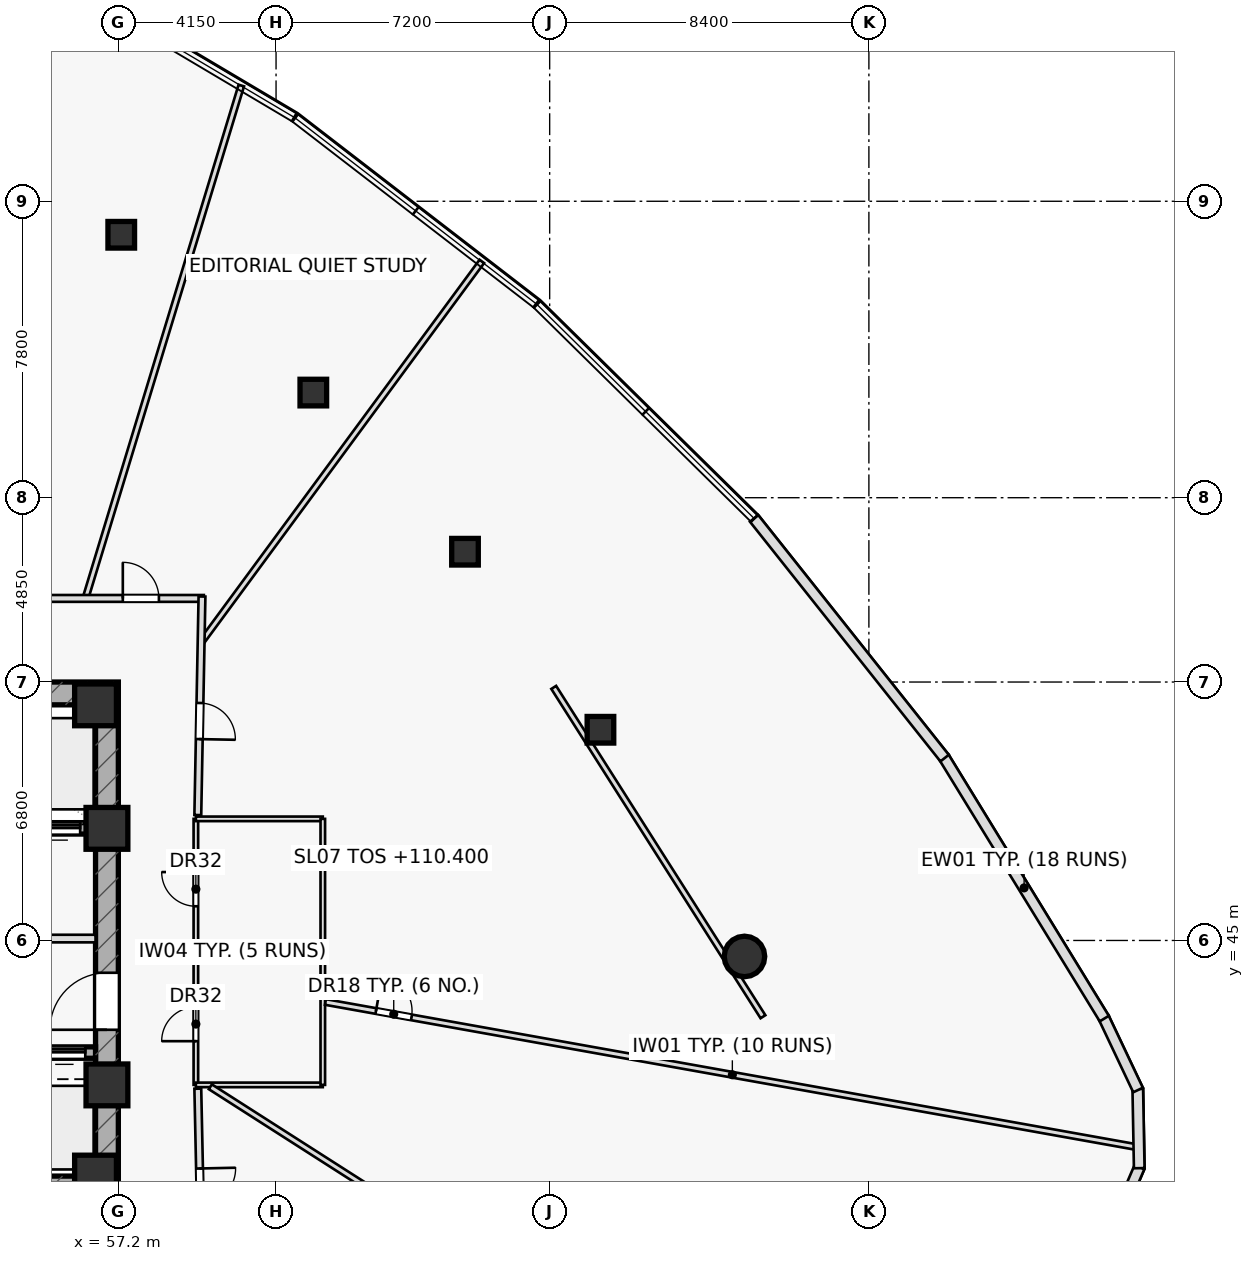
"""IFC4 building model, lengths in metres.
Left out: names, types, materials, properties, quantities, classifications, styles, units other than length and angle.
Written with IfcOpenShell. Run it as: python <this file> out.ifc"""

import sys

from ifc_helpers import new_model, si_unit, direction, frame, frame_2d, origin, origin_2d, place, context, subcontext, project, spatial, rectangle, hollow_rectangle, hollow_circle, extrude, element, fill, save


model = new_model("IFC4")
c1 = context("Model", 3, precision=1e-05, world=origin(), true_north=direction((0.0, 1.0)))
c2 = subcontext(c1, "Body", "Model", "MODEL_VIEW")
j1 = project(units=[si_unit("LENGTHUNIT", "METRE"), si_unit("PLANEANGLEUNIT", "RADIAN")], contexts=[c1])
p1 = place(None, origin())
s1 = spatial("IfcSite", under=j1, at=p1, CompositionType="ELEMENT")
p2 = place(p1, origin())
s2 = spatial("IfcBuilding", under=s1, at=p2, CompositionType="ELEMENT")
p3 = place(p2, frame((0.0, 0.0, 110.4)))
s3 = spatial("IfcBuildingStorey", under=s2, at=p3, CompositionType="ELEMENT", Elevation=110.4)
p4 = place(p3, frame((42.8, 51.5, 0.0), z_axis=(0.0, 0.0, 1.0), x_axis=(1.0, 0.0, 0.0)))
e1 = element("IfcWall", 1, at=p4, inside=s3, PredefinedType="SHEAR", context=c2, shape_type="SweptSolid", body=[
    extrude(rectangle(XDim=14.4, YDim=0.6, at=frame_2d((7.2, 0.0))), origin(), (0.0, 0.0, 1.0), 4.9),
])
p5 = place(p4, frame((0.88, 0.0, 0.0)))
e2 = element("IfcOpeningElement", 2, at=p5, cuts=e1, PredefinedType="OPENING", context=c2, shape_type="SweptSolid", body=[
    extrude(rectangle(XDim=1.05, YDim=2.2, at=frame_2d((0.525, 1.1))), frame((0.0, 0.31, 0.0), z_axis=(0.0, -1.0, 0.0), x_axis=(1.0, 0.0, 0.0)), (0.0, 0.0, 1.0), 0.62),
])
p6 = place(p3, frame((42.8, 38.5, 0.0), z_axis=(0.0, 0.0, 1.0), x_axis=(1.0, 0.0, 0.0)))
e3 = element("IfcWall", 3, at=p6, inside=s3, PredefinedType="SHEAR", context=c2, shape_type="SweptSolid", body=[
    extrude(rectangle(XDim=14.4, YDim=0.6, at=frame_2d((7.2, 0.0))), origin(), (0.0, 0.0, 1.0), 4.9),
])
p7 = place(p6, frame((0.88, 0.0, 0.0)))
e4 = element("IfcOpeningElement", 4, at=p7, cuts=e3, PredefinedType="OPENING", context=c2, shape_type="SweptSolid", body=[
    extrude(rectangle(XDim=1.05, YDim=2.2, at=frame_2d((0.525, 1.1))), frame((0.0, 0.31, 0.0), z_axis=(0.0, -1.0, 0.0), x_axis=(1.0, 0.0, 0.0)), (0.0, 0.0, 1.0), 0.62),
])
p8 = place(p3, frame((56.9, 38.8, 0.0), z_axis=(0.0, 0.0, 1.0), x_axis=(0.0, 1.0, 0.0)))
e5 = element("IfcWall", 5, at=p8, inside=s3, PredefinedType="SHEAR", context=c2, shape_type="SweptSolid", body=[
    extrude(rectangle(XDim=12.4, YDim=0.6, at=frame_2d((6.2, 0.0))), origin(), (0.0, 0.0, 1.0), 4.9),
])
p9 = place(p8, frame((3.85, 0.0, 0.0)))
e6 = element("IfcOpeningElement", 6, at=p9, cuts=e5, PredefinedType="OPENING", context=c2, shape_type="SweptSolid", body=[
    extrude(rectangle(XDim=1.5, YDim=2.2, at=frame_2d((0.75, 1.1))), frame((0.0, 0.31, 0.0), z_axis=(0.0, -1.0, 0.0), x_axis=(1.0, 0.0, 0.0)), (0.0, 0.0, 1.0), 0.62),
])
p10 = place(p3, frame((43.4, 47.95, 0.0), z_axis=(0.0, 0.0, 1.0), x_axis=(1.0, 0.0, 0.0)))
e7 = element("IfcWall", 7, at=p10, inside=s3, PredefinedType="SHEAR", context=c2, shape_type="SweptSolid", body=[
    extrude(rectangle(XDim=13.2, YDim=0.3, at=frame_2d((6.6, 0.0))), origin(), (0.0, 0.0, 1.0), 4.9),
])
p11 = place(p10, frame((8.345, 0.0, 0.0)))
e8 = element("IfcOpeningElement", 8, at=p11, cuts=e7, PredefinedType="OPENING", context=c2, shape_type="SweptSolid", body=[
    extrude(rectangle(XDim=1.15, YDim=2.2, at=frame_2d((0.575, 1.1))), frame((0.0, 0.16, 0.0), z_axis=(0.0, -1.0, 0.0), x_axis=(1.0, 0.0, 0.0)), (0.0, 0.0, 1.0), 0.32),
])
p12 = place(p10, frame((10.065, 0.0, 0.0)))
e9 = element("IfcOpeningElement", 9, at=p12, cuts=e7, PredefinedType="OPENING", context=c2, shape_type="SweptSolid", body=[
    extrude(rectangle(XDim=1.15, YDim=2.2, at=frame_2d((0.575, 1.1))), frame((0.0, 0.16, 0.0), z_axis=(0.0, -1.0, 0.0), x_axis=(1.0, 0.0, 0.0)), (0.0, 0.0, 1.0), 0.32),
])
p13 = place(p10, frame((11.645, 0.0, 0.0)))
e10 = element("IfcOpeningElement", 10, at=p13, cuts=e7, PredefinedType="OPENING", context=c2, shape_type="SweptSolid", body=[
    extrude(rectangle(XDim=1.15, YDim=2.2, at=frame_2d((0.575, 1.1))), frame((0.0, 0.16, 0.0), z_axis=(0.0, -1.0, 0.0), x_axis=(1.0, 0.0, 0.0)), (0.0, 0.0, 1.0), 0.32),
])
p14 = place(p3, frame((43.4, 42.05, 0.0), z_axis=(0.0, 0.0, 1.0), x_axis=(1.0, 0.0, 0.0)))
e11 = element("IfcWall", 11, at=p14, inside=s3, PredefinedType="SHEAR", context=c2, shape_type="SweptSolid", body=[
    extrude(rectangle(XDim=13.2, YDim=0.3, at=frame_2d((6.6, 0.0))), origin(), (0.0, 0.0, 1.0), 4.9),
])
p15 = place(p14, frame((8.37, 0.0, 0.0)))
e12 = element("IfcOpeningElement", 12, at=p15, cuts=e11, PredefinedType="OPENING", context=c2, shape_type="SweptSolid", body=[
    extrude(rectangle(XDim=1.1, YDim=2.15, at=frame_2d((0.55, 1.075))), frame((0.0, 0.16, 0.0), z_axis=(0.0, -1.0, 0.0), x_axis=(1.0, 0.0, 0.0)), (0.0, 0.0, 1.0), 0.32),
])
p16 = place(p14, frame((10.09, 0.0, 0.0)))
e13 = element("IfcOpeningElement", 13, at=p16, cuts=e11, PredefinedType="OPENING", context=c2, shape_type="SweptSolid", body=[
    extrude(rectangle(XDim=1.1, YDim=2.15, at=frame_2d((0.55, 1.075))), frame((0.0, 0.16, 0.0), z_axis=(0.0, -1.0, 0.0), x_axis=(1.0, 0.0, 0.0)), (0.0, 0.0, 1.0), 0.32),
])
p17 = place(p14, frame((11.83, 0.0, 0.0)))
e14 = element("IfcOpeningElement", 14, at=p17, cuts=e11, PredefinedType="OPENING", context=c2, shape_type="SweptSolid", body=[
    extrude(rectangle(XDim=1.1, YDim=2.15, at=frame_2d((0.55, 1.075))), frame((0.0, 0.16, 0.0), z_axis=(0.0, -1.0, 0.0), x_axis=(1.0, 0.0, 0.0)), (0.0, 0.0, 1.0), 0.32),
])
for number, where, z_axis, x_axis in (
    (15, (56.9, 47.95, 0.0), (0.0, 0.0, 1.0), (1.0, 0.0, 0.0)),
    (16, (56.6, 51.2, 0.0), (0.0, 0.0, 1.0), (1.0, 0.0, 0.0)),
    (17, (56.9, 41.2, 0.0), (0.0, 0.0, 1.0), (1.0, 0.0, 0.0)),
    (18, (56.6, 38.8, 0.0), (0.0, 0.0, 1.0), (1.0, 0.0, 0.0)),
):
    element("IfcColumn", number, at=place(p3, frame(where, z_axis=z_axis, x_axis=x_axis)), inside=s3, PredefinedType="COLUMN", context=c2, shape_type="SweptSolid", body=[
        extrude(rectangle(XDim=1.1, YDim=1.1, at=origin_2d()), origin(), (0.0, 0.0, 1.0), 4.9),
    ])
p18 = place(p3, frame((73.676, 44.58, 0.0), z_axis=(0.0, 0.0, 1.0), x_axis=(1.0, 0.0, 0.0)))
e19 = element("IfcColumn", 19, at=p18, inside=s3, PredefinedType="COLUMN", context=c2, shape_type="SweptSolid", body=[
    extrude(hollow_circle(Radius=0.533, WallThickness=0.045, at=origin_2d()), origin(), (0.0, 0.0, 1.0), 4.9),
])
for number, where, z_axis, x_axis in (
    (20, (69.886, 50.544, 0.0), (0.0, 0.0, 1.0), (1.0, 0.0, 0.0)),
    (21, (66.322, 55.229, 0.0), (0.0, 0.0, 1.0), (1.0, 0.0, 0.0)),
    (22, (62.331, 59.416, 0.0), (0.0, 0.0, 1.0), (1.0, 0.0, 0.0)),
    (23, (57.277, 63.568, 0.0), (0.0, 0.0, 1.0), (1.0, 0.0, 0.0)),
):
    element("IfcColumn", number, at=place(p3, frame(where, z_axis=z_axis, x_axis=x_axis)), inside=s3, PredefinedType="COLUMN", context=c2, shape_type="SweptSolid", body=[
        extrude(hollow_rectangle(XDim=0.7, YDim=0.7, WallThickness=0.04, at=origin_2d()), origin(), (0.0, 0.0, 1.0), 4.9),
    ])
p19 = place(p3, frame((50.65, 45.05, 0.0), z_axis=(0.0, 0.0, 1.0), x_axis=(1.0, 0.0, 0.0)))
e24 = element("IfcWall", 24, at=p19, inside=s3, PredefinedType="PARTITIONING", context=c2, shape_type="SweptSolid", body=[
    extrude(rectangle(XDim=5.95, YDim=0.2, at=frame_2d((2.975, 0.0))), origin(), (0.0, 0.0, 1.0), 4.9),
])
p20 = place(p19, frame((1.35, 0.0, 0.0)))
e25 = element("IfcOpeningElement", 25, at=p20, cuts=e24, PredefinedType="OPENING", context=c2, shape_type="SweptSolid", body=[
    extrude(rectangle(XDim=1.5, YDim=2.2, at=frame_2d((0.75, 1.1))), frame((0.0, 0.11, 0.0), z_axis=(0.0, -1.0, 0.0), x_axis=(1.0, 0.0, 0.0)), (0.0, 0.0, 1.0), 0.22),
])
p21 = place(p3, frame((74.163, 42.993, 0.0), z_axis=(0.0, 0.0, 1.0), x_axis=(-0.53628142437, 0.844039237166, 0.0)))
e26 = element("IfcWall", 26, at=p21, inside=s3, PredefinedType="PARTITIONING", context=c2, shape_type="SweptSolid", body=[
    extrude(rectangle(XDim=10.267, YDim=0.15, at=frame_2d((5.133, 0.0))), origin(), (0.0, 0.0, 1.0), 4.185),
])
p22 = place(p3, frame((59.24, 41.2, 0.0), z_axis=(0.0, 0.0, 1.0), x_axis=(0.0, 1.0, 0.0)))
e27 = element("IfcWall", 27, at=p22, inside=s3, PredefinedType="PARTITIONING", context=c2, shape_type="SweptSolid", body=[
    extrude(rectangle(XDim=7.0, YDim=0.12, at=frame_2d((3.5, 0.0))), origin(), (0.0, 0.0, 1.0), 4.9),
])
p23 = place(p22, frame((1.15, 0.0, 0.0)))
e28 = element("IfcOpeningElement", 28, at=p23, cuts=e27, PredefinedType="OPENING", context=c2, shape_type="SweptSolid", body=[
    extrude(rectangle(XDim=0.9, YDim=2.05, at=frame_2d((0.45, 1.025))), frame((0.0, 0.07, 0.0), z_axis=(0.0, -1.0, 0.0), x_axis=(1.0, 0.0, 0.0)), (0.0, 0.0, 1.0), 0.14),
])
p24 = place(p22, frame((4.7, 0.0, 0.0)))
e29 = element("IfcOpeningElement", 29, at=p24, cuts=e27, PredefinedType="OPENING", context=c2, shape_type="SweptSolid", body=[
    extrude(rectangle(XDim=0.9, YDim=2.05, at=frame_2d((0.45, 1.025))), frame((0.0, 0.07, 0.0), z_axis=(0.0, -1.0, 0.0), x_axis=(1.0, 0.0, 0.0)), (0.0, 0.0, 1.0), 0.14),
])
for number, where, z_axis, x_axis in (
    (30, (59.24, 41.2, 0.0), (0.0, 0.0, 1.0), (1.0, 0.0, 0.0)),
    (31, (59.24, 44.65, 0.0), (0.0, 0.0, 1.0), (1.0, 0.0, 0.0)),
    (32, (59.24, 48.2, 0.0), (0.0, 0.0, 1.0), (1.0, 0.0, 0.0)),
):
    element("IfcWall", number, at=place(p3, frame(where, z_axis=z_axis, x_axis=x_axis)), inside=s3, PredefinedType="PARTITIONING", context=c2, shape_type="SweptSolid", body=[
        extrude(rectangle(XDim=3.34, YDim=0.12, at=frame_2d((1.67, 0.0))), origin(), (0.0, 0.0, 1.0), 4.9),
    ])
p25 = place(p3, frame((62.58, 41.2, 0.0), z_axis=(0.0, 0.0, 1.0), x_axis=(0.0, 1.0, 0.0)))
e33 = element("IfcWall", 33, at=p25, inside=s3, PredefinedType="PARTITIONING", context=c2, shape_type="SweptSolid", body=[
    extrude(rectangle(XDim=7.0, YDim=0.12, at=frame_2d((3.5, 0.0))), origin(), (0.0, 0.0, 1.0), 4.9),
])
p26 = place(p3, frame((59.621, 41.15, 0.0), z_axis=(0.0, 0.0, 1.0), x_axis=(0.842493606908, -0.538706341451, 0.0)))
e34 = element("IfcWall", 34, at=p26, inside=s3, PredefinedType="PARTITIONING", context=c2, shape_type="SweptSolid", body=[
    extrude(rectangle(XDim=18.711, YDim=0.15, at=frame_2d((9.355, 0.0))), origin(), (0.0, 0.0, 1.0), 4.185),
])
p27 = place(p3, frame((62.65, 43.381, 0.0), z_axis=(0.0, 0.0, 1.0), x_axis=(0.984377109133, -0.176073016146, 0.0)))
e35 = element("IfcWall", 35, at=p27, inside=s3, PredefinedType="PARTITIONING", context=c2, shape_type="SweptSolid", body=[
    extrude(rectangle(XDim=21.754, YDim=0.15, at=frame_2d((10.877, 0.0))), origin(), (0.0, 0.0, 1.0), 4.185),
])
p28 = place(p27, frame((1.35, 0.0, 0.0)))
e36 = element("IfcOpeningElement", 36, at=p28, cuts=e35, PredefinedType="OPENING", context=c2, shape_type="SweptSolid", body=[
    extrude(rectangle(XDim=0.95, YDim=2.05, at=frame_2d((0.475, 1.025))), frame((0.0, 0.085, 0.0), z_axis=(0.0, -1.0, 0.0), x_axis=(1.0, 0.0, 0.0)), (0.0, 0.0, 1.0), 0.17),
])
p29 = place(p3, frame((59.378, 52.842, 0.0), z_axis=(0.0, 0.0, 1.0), x_axis=(0.593184325991, 0.805066677611, 0.0)))
e37 = element("IfcWall", 37, at=p29, inside=s3, PredefinedType="PARTITIONING", context=c2, shape_type="SweptSolid", body=[
    extrude(rectangle(XDim=12.453, YDim=0.15, at=frame_2d((6.227, 0.0))), origin(), (0.0, 0.0, 1.0), 4.325),
])
p30 = place(p3, frame((56.335, 54.0, 0.0), z_axis=(0.0, 0.0, 1.0), x_axis=(0.290737997742, 0.956802705195, 0.0)))
e38 = element("IfcWall", 38, at=p30, inside=s3, PredefinedType="PARTITIONING", context=c2, shape_type="SweptSolid", body=[
    extrude(rectangle(XDim=14.105, YDim=0.15, at=frame_2d((7.052, 0.0))), origin(), (0.0, 0.0, 1.0), 4.185),
])
p31 = place(p3, frame((54.3, 54.0, 0.0), z_axis=(0.0, 0.0, 1.0), x_axis=(1.0, 0.0, 0.0)))
e39 = element("IfcWall", 39, at=p31, inside=s3, PredefinedType="PARTITIONING", context=c2, shape_type="SweptSolid", body=[
    extrude(rectangle(XDim=5.15, YDim=0.18, at=frame_2d((2.575, 0.0))), origin(), (0.0, 0.0, 1.0), 4.185),
])
p32 = place(p31, frame((3.018, 0.0, 0.0)))
e40 = element("IfcOpeningElement", 40, at=p32, cuts=e39, PredefinedType="OPENING", context=c2, shape_type="SweptSolid", body=[
    extrude(rectangle(XDim=0.95, YDim=2.05, at=frame_2d((0.475, 1.025))), frame((0.0, 0.1, 0.0), z_axis=(0.0, -1.0, 0.0), x_axis=(1.0, 0.0, 0.0)), (0.0, 0.0, 1.0), 0.2),
])
p33 = place(p3, frame((59.401, 54.05, 0.0), z_axis=(0.0, 0.0, 1.0), x_axis=(-0.019103170983, -0.999817517779, 0.0)))
e41 = element("IfcWall", 41, at=p33, inside=s3, PredefinedType="PARTITIONING", context=c2, shape_type="SweptSolid", body=[
    extrude(rectangle(XDim=5.751, YDim=0.18, at=frame_2d((2.875, 0.0))), origin(), (0.0, 0.0, 1.0), 4.185),
])
p34 = place(p33, frame((2.802, 0.0, 0.0)))
e42 = element("IfcOpeningElement", 42, at=p34, cuts=e41, PredefinedType="OPENING", context=c2, shape_type="SweptSolid", body=[
    extrude(rectangle(XDim=0.95, YDim=2.05, at=frame_2d((0.475, 1.025))), frame((0.0, 0.1, 0.0), z_axis=(0.0, -1.0, 0.0), x_axis=(1.0, 0.0, 0.0)), (0.0, 0.0, 1.0), 0.2),
])
p35 = place(p3, frame((59.291, 41.1, 0.0), z_axis=(0.0, 0.0, 1.0), x_axis=(0.021374589398, -0.999771537366, 0.0)))
e43 = element("IfcWall", 43, at=p35, inside=s3, PredefinedType="PARTITIONING", context=c2, shape_type="SweptSolid", body=[
    extrude(rectangle(XDim=5.151, YDim=0.18, at=frame_2d((2.576, 0.0))), origin(), (0.0, 0.0, 1.0), 4.185),
])
p36 = place(p35, frame((2.101, 0.0, 0.0)))
e44 = element("IfcOpeningElement", 44, at=p36, cuts=e43, PredefinedType="OPENING", context=c2, shape_type="SweptSolid", body=[
    extrude(rectangle(XDim=0.95, YDim=2.05, at=frame_2d((0.475, 1.025))), frame((0.0, 0.1, 0.0), z_axis=(0.0, -1.0, 0.0), x_axis=(1.0, 0.0, 0.0)), (0.0, 0.0, 1.0), 0.2),
])
p37 = place(p3, frame((83.246, 37.121, 0.0), z_axis=(0.0, 0.0, 1.0), x_axis=(0.39478079267, 0.918775340189, 0.0)))
e45 = element("IfcWall", 45, at=p37, inside=s3, PredefinedType="STANDARD", context=c2, shape_type="SweptSolid", body=[
    extrude(rectangle(XDim=2.086, YDim=0.28, at=frame_2d((1.043, 0.0))), origin(), (0.0, 0.0, 1.0), 4.9),
])
p38 = place(p3, frame((84.064, 39.008, 0.0), z_axis=(0.0, 0.0, 1.0), x_axis=(-0.018259657159, 0.999833278562, 0.0)))
e46 = element("IfcWall", 46, at=p38, inside=s3, PredefinedType="STANDARD", context=c2, shape_type="SweptSolid", body=[
    extrude(rectangle(XDim=2.086, YDim=0.28, at=frame_2d((1.043, 0.0))), origin(), (0.0, 0.0, 1.0), 4.9),
])
p39 = place(p3, frame((84.032, 41.065, 0.0), z_axis=(0.0, 0.0, 1.0), x_axis=(-0.428170954588, 0.903697755695, 0.0)))
e47 = element("IfcWall", 47, at=p39, inside=s3, PredefinedType="STANDARD", context=c2, shape_type="SweptSolid", body=[
    extrude(rectangle(XDim=2.109, YDim=0.28, at=frame_2d((1.054, 0.0))), origin(), (0.0, 0.0, 1.0), 4.9),
])
p40 = place(p3, frame((83.144, 42.944, 0.0), z_axis=(0.0, 0.0, 1.0), x_axis=(-0.522840865812, 0.852430307437, 0.0)))
e48 = element("IfcWall", 48, at=p40, inside=s3, PredefinedType="STANDARD", context=c2, shape_type="SweptSolid", body=[
    extrude(rectangle(XDim=8.069, YDim=0.28, at=frame_2d((4.034, 0.0))), origin(), (0.0, 0.0, 1.0), 4.9),
])
p41 = place(p3, frame((78.942, 49.798, 0.0), z_axis=(0.0, 0.0, 1.0), x_axis=(-0.622164130461, 0.782886833947, 0.0)))
e49 = element("IfcWall", 49, at=p41, inside=s3, PredefinedType="STANDARD", context=c2, shape_type="SweptSolid", body=[
    extrude(rectangle(XDim=8.057, YDim=0.28, at=frame_2d((4.028, 0.0))), origin(), (0.0, 0.0, 1.0), 4.9),
])
p42 = place(p9, origin())
e50 = element("IfcDoor", 50, at=p42, inside=s3, OperationType="SINGLE_SWING_LEFT", PredefinedType="DOOR", context=c2, shape_type="SweptSolid", body=[
    extrude(rectangle(XDim=1.5, YDim=2.2, at=frame_2d((0.75, 1.1))), frame((0.0, 0.025, 0.0), z_axis=(0.0, -1.0, 0.0), x_axis=(1.0, 0.0, 0.0)), (0.0, 0.0, 1.0), 0.05),
])
fill(e6, e50)
p43 = place(p23, origin())
e51 = element("IfcDoor", 51, at=p43, inside=s3, OperationType="SINGLE_SWING_LEFT", PredefinedType="DOOR", context=c2, shape_type="SweptSolid", body=[
    extrude(rectangle(XDim=0.9, YDim=2.05, at=frame_2d((0.45, 1.025))), frame((0.0, 0.025, 0.0), z_axis=(0.0, -1.0, 0.0), x_axis=(1.0, 0.0, 0.0)), (0.0, 0.0, 1.0), 0.05),
])
fill(e28, e51)
p44 = place(p24, origin())
e52 = element("IfcDoor", 52, at=p44, inside=s3, OperationType="SINGLE_SWING_RIGHT", PredefinedType="DOOR", context=c2, shape_type="SweptSolid", body=[
    extrude(rectangle(XDim=0.9, YDim=2.05, at=frame_2d((0.45, 1.025))), frame((0.0, 0.025, 0.0), z_axis=(0.0, -1.0, 0.0), x_axis=(1.0, 0.0, 0.0)), (0.0, 0.0, 1.0), 0.05),
])
fill(e29, e52)
p45 = place(p28, origin())
e53 = element("IfcDoor", 53, at=p45, inside=s3, OperationType="SINGLE_SWING_LEFT", PredefinedType="DOOR", context=c2, shape_type="SweptSolid", body=[
    extrude(rectangle(XDim=0.95, YDim=2.05, at=frame_2d((0.475, 1.025))), frame((0.0, 0.025, 0.0), z_axis=(0.0, -1.0, 0.0), x_axis=(1.0, 0.0, 0.0)), (0.0, 0.0, 1.0), 0.05),
])
fill(e36, e53)
p46 = place(p32, origin())
e54 = element("IfcDoor", 54, at=p46, inside=s3, OperationType="SINGLE_SWING_LEFT", PredefinedType="DOOR", context=c2, shape_type="SweptSolid", body=[
    extrude(rectangle(XDim=0.95, YDim=2.05, at=frame_2d((0.475, 1.025))), frame((0.0, 0.025, 0.0), z_axis=(0.0, -1.0, 0.0), x_axis=(1.0, 0.0, 0.0)), (0.0, 0.0, 1.0), 0.05),
])
fill(e40, e54)
p47 = place(p34, origin())
e55 = element("IfcDoor", 55, at=p47, inside=s3, OperationType="SINGLE_SWING_RIGHT", PredefinedType="DOOR", context=c2, shape_type="SweptSolid", body=[
    extrude(rectangle(XDim=0.95, YDim=2.05, at=frame_2d((0.475, 1.025))), frame((0.0, 0.025, 0.0), z_axis=(0.0, -1.0, 0.0), x_axis=(1.0, 0.0, 0.0)), (0.0, 0.0, 1.0), 0.05),
])
fill(e42, e55)
p48 = place(p36, origin())
e56 = element("IfcDoor", 56, at=p48, inside=s3, OperationType="SINGLE_SWING_LEFT", PredefinedType="DOOR", context=c2, shape_type="SweptSolid", body=[
    extrude(rectangle(XDim=0.95, YDim=2.05, at=frame_2d((0.475, 1.025))), frame((0.0, 0.025, 0.0), z_axis=(0.0, -1.0, 0.0), x_axis=(1.0, 0.0, 0.0)), (0.0, 0.0, 1.0), 0.05),
])
fill(e44, e56)
p49 = place(p13, origin())
e57 = element("IfcDoor", 57, at=p49, inside=s3, OperationType="SLIDING_TO_LEFT", PredefinedType="DOOR", context=c2, shape_type="SweptSolid", body=[
    extrude(rectangle(XDim=1.15, YDim=2.2, at=frame_2d((0.575, 1.1))), frame((0.0, 0.025, 0.0), z_axis=(0.0, -1.0, 0.0), x_axis=(1.0, 0.0, 0.0)), (0.0, 0.0, 1.0), 0.05),
])
fill(e10, e57)
p50 = place(p17, origin())
e58 = element("IfcDoor", 58, at=p50, inside=s3, OperationType="SLIDING_TO_LEFT", PredefinedType="DOOR", context=c2, shape_type="SweptSolid", body=[
    extrude(rectangle(XDim=1.1, YDim=2.15, at=frame_2d((0.55, 1.075))), frame((0.0, 0.025, 0.0), z_axis=(0.0, -1.0, 0.0), x_axis=(1.0, 0.0, 0.0)), (0.0, 0.0, 1.0), 0.05),
])
fill(e14, e58)
save(model, sys.argv[1])
